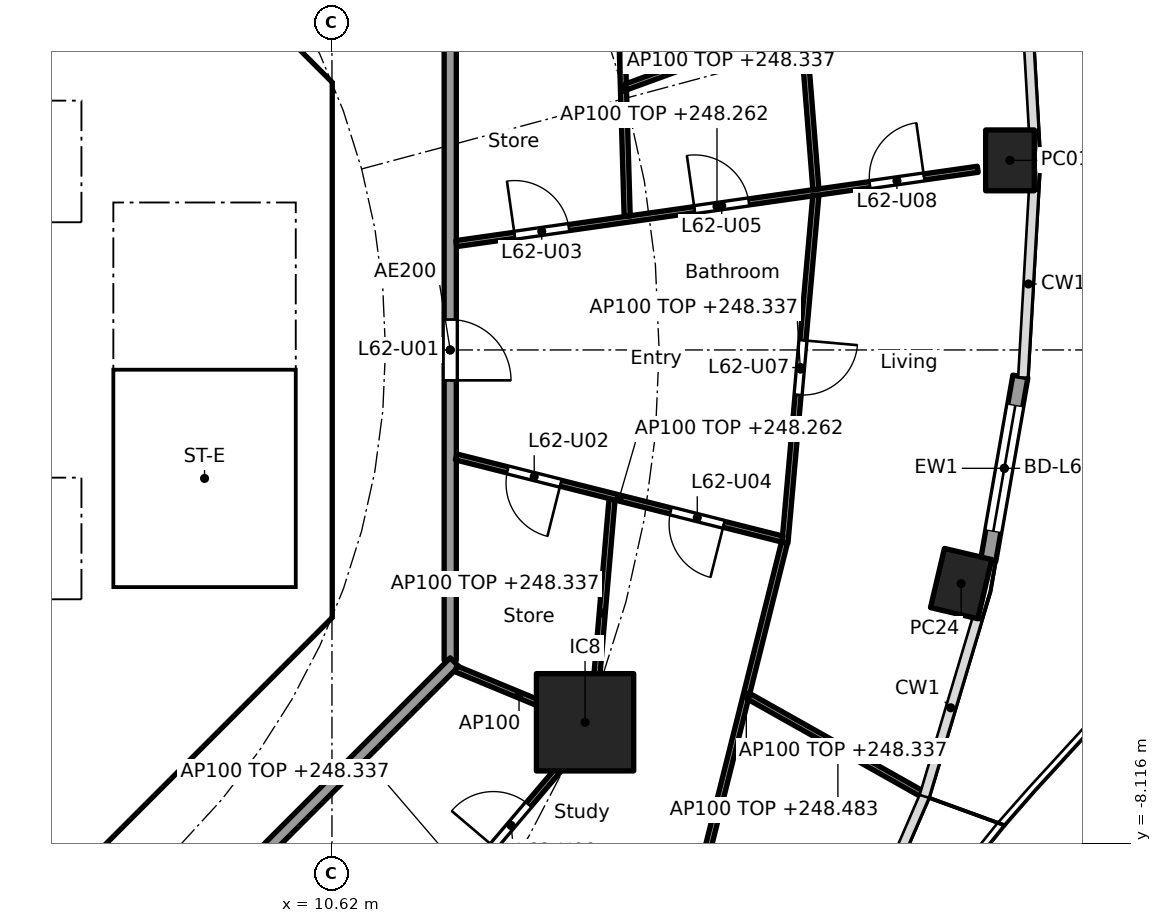
"""IFC4 building model, lengths in metres.
Left out: names, types, materials, properties, quantities, classifications, styles, units other than length and angle.
Written with IfcOpenShell. Run it as: python <this file> out.ifc"""

import sys

from ifc_helpers import new_model, si_unit, direction, frame, frame_2d, origin, origin_2d, place, context, subcontext, project, spatial, polyline, rectangle, hollow_rectangle, outline, extrude, element, fill, save


model = new_model("IFC4")
c1 = context("Model", 3, precision=1e-05, world=origin(), true_north=direction((0.0, 1.0)))
c2 = subcontext(c1, "Body", "Model", "MODEL_VIEW")
j1 = project(units=[si_unit("LENGTHUNIT", "METRE"), si_unit("PLANEANGLEUNIT", "RADIAN")], contexts=[c1])
p1 = place(None, origin())
s1 = spatial("IfcSite", under=j1, at=p1, CompositionType="ELEMENT")
p2 = place(p1, origin())
s2 = spatial("IfcBuilding", under=s1, at=p2, CompositionType="ELEMENT")
p3 = place(p2, frame((0.0, 0.0, 245.5)))
s3 = spatial("IfcBuildingStorey", under=s2, at=p3, CompositionType="ELEMENT", Elevation=245.5)
for number, where, z_axis, x_axis in (
    (1, (21.77, 3.118, 0.0), (0.0, 0.0, 1.0), (0.0, 1.0, 0.0)),
    (2, (20.967, -3.842, 0.0), (0.0, 0.0, 1.0), (0.229, 0.973, 0.0)),
):
    element("IfcColumn", number, at=place(p3, frame(where, z_axis=z_axis, x_axis=x_axis)), inside=s3, PredefinedType="COLUMN", context=c2, shape_type="SweptSolid", body=[
        extrude(hollow_rectangle(XDim=1.0, YDim=0.8, WallThickness=0.032, at=origin_2d()), origin(), (0.0, 0.0, 1.0), 3.7),
    ])
p4 = place(p3, frame((14.782, -6.123, 0.0), z_axis=(0.0, 0.0, 1.0), x_axis=(1.0, 0.0, 0.0)))
e3 = element("IfcColumn", 3, at=p4, inside=s3, PredefinedType="COLUMN", context=c2, shape_type="SweptSolid", body=[
    extrude(rectangle(XDim=1.6, YDim=1.6, at=origin_2d()), origin(), (0.0, 0.0, 1.0), 3.7),
])
p5 = place(p3, frame((21.941, -0.436, 0.0), z_axis=(0.0, 0.0, 1.0), x_axis=(-0.172164083933, -0.985068286061, 0.0)))
e4 = element("IfcWall", 4, at=p5, inside=s3, PredefinedType="SOLIDWALL", context=c2, shape_type="SweptSolid", body=[
    extrude(rectangle(XDim=3.067, YDim=0.25, at=frame_2d((1.534, 0.0))), origin(), (0.0, 0.0, 1.0), 3.44),
])
p6 = place(p5, frame((0.484, 0.0, 0.0)))
e5 = element("IfcOpeningElement", 5, at=p6, cuts=e4, PredefinedType="OPENING", context=c2, shape_type="SweptSolid", body=[
    extrude(rectangle(XDim=2.1, YDim=2.4, at=frame_2d((1.05, 1.2))), frame((0.0, 0.135, 0.0), z_axis=(0.0, -1.0, 0.0), x_axis=(1.0, 0.0, 0.0)), (0.0, 0.0, 1.0), 0.27),
])
p7 = place(p3, frame((9.988, 4.613, 0.0), z_axis=(0.0, 0.0, 1.0), x_axis=(-0.707106781187, 0.707106781187, 0.0)))
e6 = element("IfcWall", 6, at=p7, inside=s3, PredefinedType="SHEAR", context=c2, shape_type="SweptSolid", body=[
    extrude(rectangle(XDim=7.602, YDim=0.6, at=frame_2d((3.801, 0.0))), origin(), (0.0, 0.0, 1.0), 3.44),
])
p8 = place(p7, frame((3.201, 0.0, 0.0)))
e7 = element("IfcOpeningElement", 7, at=p8, cuts=e6, PredefinedType="OPENING", context=c2, shape_type="SweptSolid", body=[
    extrude(rectangle(XDim=1.2, YDim=2.1, at=frame_2d((0.6, 1.05))), frame((0.0, 0.31, 0.0), z_axis=(0.0, -1.0, 0.0), x_axis=(1.0, 0.0, 0.0)), (0.0, 0.0, 1.0), 0.62),
])
p9 = place(p3, frame((4.613, -9.988, 0.0), z_axis=(0.0, 0.0, 1.0), x_axis=(0.707106781187, 0.707106781187, 0.0)))
e8 = element("IfcWall", 8, at=p9, inside=s3, PredefinedType="SHEAR", context=c2, shape_type="SweptSolid", body=[
    extrude(rectangle(XDim=7.602, YDim=0.6, at=frame_2d((3.801, 0.0))), origin(), (0.0, 0.0, 1.0), 3.44),
])
p10 = place(p9, frame((3.201, 0.0, 0.0)))
e9 = element("IfcOpeningElement", 9, at=p10, cuts=e8, PredefinedType="OPENING", context=c2, shape_type="SweptSolid", body=[
    extrude(rectangle(XDim=1.2, YDim=2.1, at=frame_2d((0.6, 1.05))), frame((0.0, 0.31, 0.0), z_axis=(0.0, -1.0, 0.0), x_axis=(1.0, 0.0, 0.0)), (0.0, 0.0, 1.0), 0.62),
])
p11 = place(p3, frame((-6.7, 2.0, 0.0), z_axis=(0.0, 0.0, 1.0), x_axis=(1.0, 0.0, 0.0)))
e10 = element("IfcWall", 10, at=p11, inside=s3, PredefinedType="SOLIDWALL", context=c2, shape_type="SweptSolid", body=[
    extrude(rectangle(XDim=13.4, YDim=0.2, at=frame_2d((6.7, 0.0))), origin(), (0.0, 0.0, 1.0), 3.44),
])
p12 = place(p11, frame((7.25, 0.0, 0.0)))
e11 = element("IfcOpeningElement", 11, at=p12, cuts=e10, PredefinedType="OPENING", context=c2, shape_type="SweptSolid", body=[
    extrude(rectangle(XDim=1.1, YDim=2.1, at=frame_2d((0.55, 1.05))), frame((0.0, 0.11, 0.0), z_axis=(0.0, -1.0, 0.0), x_axis=(1.0, 0.0, 0.0)), (0.0, 0.0, 1.0), 0.22),
])
p13 = place(p11, frame((9.45, 0.0, 0.0)))
e12 = element("IfcOpeningElement", 12, at=p13, cuts=e10, PredefinedType="OPENING", context=c2, shape_type="SweptSolid", body=[
    extrude(rectangle(XDim=1.1, YDim=2.1, at=frame_2d((0.55, 1.05))), frame((0.0, 0.11, 0.0), z_axis=(0.0, -1.0, 0.0), x_axis=(1.0, 0.0, 0.0)), (0.0, 0.0, 1.0), 0.22),
])
p14 = place(p11, frame((0.75, 0.0, 0.0)))
e13 = element("IfcOpeningElement", 13, at=p14, cuts=e10, PredefinedType="OPENING", context=c2, shape_type="SweptSolid", body=[
    extrude(rectangle(XDim=0.9, YDim=2.1, at=frame_2d((0.45, 1.05))), frame((0.0, 0.11, 0.0), z_axis=(0.0, -1.0, 0.0), x_axis=(1.0, 0.0, 0.0)), (0.0, 0.0, 1.0), 0.22),
])
p15 = place(p11, frame((4.05, 0.0, 0.0)))
e14 = element("IfcOpeningElement", 14, at=p15, cuts=e10, PredefinedType="OPENING", context=c2, shape_type="SweptSolid", body=[
    extrude(rectangle(XDim=0.9, YDim=2.1, at=frame_2d((0.45, 1.05))), frame((0.0, 0.11, 0.0), z_axis=(0.0, -1.0, 0.0), x_axis=(1.0, 0.0, 0.0)), (0.0, 0.0, 1.0), 0.22),
])
p16 = place(p3, frame((6.7, 4.0, 0.0), z_axis=(0.0, 0.0, 1.0), x_axis=(1.0, 0.0, 0.0)))
e15 = element("IfcWall", 15, at=p16, inside=s3, PredefinedType="SOLIDWALL", context=c2, shape_type="SweptSolid", body=[
    extrude(rectangle(XDim=3.325, YDim=0.2, at=frame_2d((1.662, 0.0))), origin(), (0.0, 0.0, 1.0), 3.44),
])
p17 = place(p16, frame((1.25, 0.0, 0.0)))
e16 = element("IfcOpeningElement", 16, at=p17, cuts=e15, PredefinedType="OPENING", context=c2, shape_type="SweptSolid", body=[
    extrude(rectangle(XDim=1.1, YDim=2.1, at=frame_2d((0.55, 1.05))), frame((0.0, 0.11, 0.0), z_axis=(0.0, -1.0, 0.0), x_axis=(1.0, 0.0, 0.0)), (0.0, 0.0, 1.0), 0.22),
])
p18 = place(p3, frame((-6.7, -2.0, 0.0), z_axis=(0.0, 0.0, 1.0), x_axis=(1.0, 0.0, 0.0)))
e17 = element("IfcWall", 17, at=p18, inside=s3, PredefinedType="SOLIDWALL", context=c2, shape_type="SweptSolid", body=[
    extrude(rectangle(XDim=13.4, YDim=0.2, at=frame_2d((6.7, 0.0))), origin(), (0.0, 0.0, 1.0), 3.44),
])
p19 = place(p18, frame((5.05, 0.0, 0.0)))
e18 = element("IfcOpeningElement", 18, at=p19, cuts=e17, PredefinedType="OPENING", context=c2, shape_type="SweptSolid", body=[
    extrude(rectangle(XDim=1.1, YDim=2.1, at=frame_2d((0.55, 1.05))), frame((0.0, 0.11, 0.0), z_axis=(0.0, -1.0, 0.0), x_axis=(1.0, 0.0, 0.0)), (0.0, 0.0, 1.0), 0.22),
])
p20 = place(p18, frame((7.25, 0.0, 0.0)))
e19 = element("IfcOpeningElement", 19, at=p20, cuts=e17, PredefinedType="OPENING", context=c2, shape_type="SweptSolid", body=[
    extrude(rectangle(XDim=1.1, YDim=2.1, at=frame_2d((0.55, 1.05))), frame((0.0, 0.11, 0.0), z_axis=(0.0, -1.0, 0.0), x_axis=(1.0, 0.0, 0.0)), (0.0, 0.0, 1.0), 0.22),
])
p21 = place(p18, frame((1.85, 0.0, 0.0)))
e20 = element("IfcOpeningElement", 20, at=p21, cuts=e17, PredefinedType="OPENING", context=c2, shape_type="SweptSolid", body=[
    extrude(rectangle(XDim=0.9, YDim=2.1, at=frame_2d((0.45, 1.05))), frame((0.0, 0.11, 0.0), z_axis=(0.0, -1.0, 0.0), x_axis=(1.0, 0.0, 0.0)), (0.0, 0.0, 1.0), 0.22),
])
p22 = place(p3, origin())
e21 = element("IfcWall", 21, at=p22, inside=s3, PredefinedType="SHEAR", context=c2, shape_type="SweptSolid", body=[
    extrude(outline(polyline([(9.776, -4.401), (10.025, -4.152), (10.025, -3.801), (10.025, 4.152), (9.776, 4.401), (10.2, 4.825), (10.625, 4.401), (10.625, -4.401), (10.2, -4.825), (9.776, -4.401)])), origin(), (0.0, 0.0, 1.0), 3.44),
])
p23 = place(p3, origin())
e22 = element("IfcWall", 22, at=p23, inside=s3, PredefinedType="SOLIDWALL", context=c2, shape_type="SweptSolid", body=[
    extrude(outline(polyline([(-6.7, 4.3), (6.7, 4.3), (6.7, 2.1), (6.5, 2.1), (6.5, 4.1), (4.5, 4.1), (4.5, 2.1), (4.3, 2.1), (4.3, 4.1), (2.3, 4.1), (2.3, 2.1), (2.1, 2.1), (2.1, 4.1), (0.1, 4.1), (0.1, 2.1), (-0.1, 2.1), (-0.1, 4.1), (-4.3, 4.1), (-4.3, 2.1), (-4.5, 2.1), (-4.5, 4.1), (-6.5, 4.1), (-6.5, 2.1), (-6.7, 2.1), (-6.7, 4.3)])), origin(), (0.0, 0.0, 1.0), 3.44),
])
p24 = place(p3, origin())
e23 = element("IfcWall", 23, at=p24, inside=s3, PredefinedType="SOLIDWALL", context=c2, shape_type="SweptSolid", body=[
    extrude(outline(polyline([(-6.7, -2.1), (-6.5, -2.1), (-6.5, -4.1), (-2.3, -4.1), (-2.3, -2.1), (-2.1, -2.1), (-2.1, -4.1), (-0.1, -4.1), (-0.1, -2.1), (0.1, -2.1), (0.1, -4.1), (2.1, -4.1), (2.1, -2.1), (2.3, -2.1), (2.3, -4.1), (4.3, -4.1), (4.3, -2.1), (4.5, -2.1), (4.5, -4.1), (6.5, -4.1), (6.5, -2.1), (6.7, -2.1), (6.7, -4.3), (-6.7, -4.3), (-6.7, -2.1)])), origin(), (0.0, 0.0, 1.0), 3.44),
])
p25 = place(p3, origin())
e24 = element("IfcWall", 24, at=p25, inside=s3, PredefinedType="SOLIDWALL", context=c2, shape_type="SweptSolid", body=[
    extrude(outline(polyline([(7.025, -3.9), (6.7, -3.9), (6.7, 3.9), (7.025, 3.9), (7.025, -3.9)])), origin(), (0.0, 0.0, 1.0), 3.44),
])
p26 = place(p3, origin())
e25 = element("IfcWall", 25, at=p26, inside=s3, PredefinedType="SOLIDWALL", context=c2, shape_type="SweptSolid", body=[
    extrude(outline(polyline([(10.025, -4.1), (6.7, -4.1), (6.7, -3.9), (10.025, -3.9), (10.025, -4.1)])), origin(), (0.0, 0.0, 1.0), 3.44),
])
p27 = place(p3, frame((12.565, -5.104, 0.0), z_axis=(0.0, 0.0, 1.0), x_axis=(0.0, 1.0, 0.0)))
e26 = element("IfcWall", 26, at=p27, inside=s3, PredefinedType="PARTITIONING", context=c2, shape_type="SweptSolid", body=[
    extrude(rectangle(XDim=10.209, YDim=0.2, at=frame_2d((5.104, 0.0))), origin(), (0.0, 0.0, 1.0), 3.44),
])
p28 = place(p27, frame((4.604, 0.0, 0.0)))
e27 = element("IfcOpeningElement", 27, at=p28, cuts=e26, PredefinedType="OPENING", context=c2, shape_type="SweptSolid", body=[
    extrude(rectangle(XDim=1.0, YDim=2.1, at=frame_2d((0.5, 1.05))), frame((0.0, 0.11, 0.0), z_axis=(0.0, -1.0, 0.0), x_axis=(1.0, 0.0, 0.0)), (0.0, 0.0, 1.0), 0.22),
])
p29 = place(p3, frame((5.275, -12.494, 0.0), z_axis=(0.0, 0.0, 1.0), x_axis=(0.707106781187, 0.707106781187, 0.0)))
e28 = element("IfcWall", 28, at=p29, inside=s3, PredefinedType="PARTITIONING", context=c2, shape_type="SweptSolid", body=[
    extrude(rectangle(XDim=10.409, YDim=0.2, at=frame_2d((5.205, 0.0))), origin(), (0.0, 0.0, 1.0), 3.44),
])
p30 = place(p3, frame((12.664, 1.749, 0.0), z_axis=(0.0, 0.0, 1.0), x_axis=(0.990001845476, 0.141054407783, 0.0)))
e29 = element("IfcWall", 29, at=p30, inside=s3, PredefinedType="PARTITIONING", context=c2, shape_type="SweptSolid", body=[
    extrude(rectangle(XDim=8.663, YDim=0.1, at=frame_2d((4.332, 0.0))), origin(), (0.0, 0.0, 1.0), 2.762),
])
p31 = place(p30, frame((0.97, 0.0, 0.0)))
e30 = element("IfcOpeningElement", 30, at=p31, cuts=e29, PredefinedType="OPENING", context=c2, shape_type="SweptSolid", body=[
    extrude(rectangle(XDim=0.9, YDim=2.1, at=frame_2d((0.45, 1.05))), frame((0.0, 0.06, 0.0), z_axis=(0.0, -1.0, 0.0), x_axis=(1.0, 0.0, 0.0)), (0.0, 0.0, 1.0), 0.12),
])
p32 = place(p30, frame((3.959, 0.0, 0.0)))
e31 = element("IfcOpeningElement", 31, at=p32, cuts=e29, PredefinedType="OPENING", context=c2, shape_type="SweptSolid", body=[
    extrude(rectangle(XDim=0.9, YDim=2.1, at=frame_2d((0.45, 1.05))), frame((0.0, 0.06, 0.0), z_axis=(0.0, -1.0, 0.0), x_axis=(1.0, 0.0, 0.0)), (0.0, 0.0, 1.0), 0.12),
])
p33 = place(p30, frame((6.87, 0.0, 0.0)))
e32 = element("IfcOpeningElement", 32, at=p33, cuts=e29, PredefinedType="OPENING", context=c2, shape_type="SweptSolid", body=[
    extrude(rectangle(XDim=0.9, YDim=2.1, at=frame_2d((0.45, 1.05))), frame((0.0, 0.06, 0.0), z_axis=(0.0, -1.0, 0.0), x_axis=(1.0, 0.0, 0.0)), (0.0, 0.0, 1.0), 0.12),
])
p34 = place(p3, frame((15.475, 2.2, 0.0), z_axis=(0.0, 0.0, 1.0), x_axis=(-0.029254623973, 0.999571991893, 0.0)))
e33 = element("IfcWall", 33, at=p34, inside=s3, PredefinedType="PARTITIONING", context=c2, shape_type="SweptSolid", body=[
    extrude(rectangle(XDim=4.173, YDim=0.1, at=frame_2d((2.086, 0.0))), origin(), (0.0, 0.0, 1.0), 2.837),
])
p35 = place(p3, frame((18.578, 2.642, 0.0), z_axis=(0.0, 0.0, 1.0), x_axis=(-0.079188322924, 0.996859673932, 0.0)))
e34 = element("IfcWall", 34, at=p35, inside=s3, PredefinedType="PARTITIONING", context=c2, shape_type="SweptSolid", body=[
    extrude(rectangle(XDim=5.454, YDim=0.1, at=frame_2d((2.727, 0.0))), origin(), (0.0, 0.0, 1.0), 2.837),
])
p36 = place(p35, frame((3.653, 0.0, 0.0)))
e35 = element("IfcOpeningElement", 35, at=p36, cuts=e34, PredefinedType="OPENING", context=c2, shape_type="SweptSolid", body=[
    extrude(rectangle(XDim=0.9, YDim=2.1, at=frame_2d((0.45, 1.05))), frame((0.0, 0.06, 0.0), z_axis=(0.0, -1.0, 0.0), x_axis=(1.0, 0.0, 0.0)), (0.0, 0.0, 1.0), 0.12),
])
p37 = place(p3, frame((18.578, 2.542, 0.0), z_axis=(0.0, 0.0, 1.0), x_axis=(-0.088651453697, -0.996062708748, 0.0)))
e36 = element("IfcWall", 36, at=p37, inside=s3, PredefinedType="PARTITIONING", context=c2, shape_type="SweptSolid", body=[
    extrude(rectangle(XDim=5.737, YDim=0.1, at=frame_2d((2.868, 0.0))), origin(), (0.0, 0.0, 1.0), 2.837),
])
p38 = place(p37, frame((2.393, 0.0, 0.0)))
e37 = element("IfcOpeningElement", 37, at=p38, cuts=e36, PredefinedType="OPENING", context=c2, shape_type="SweptSolid", body=[
    extrude(rectangle(XDim=0.9, YDim=2.1, at=frame_2d((0.45, 1.05))), frame((0.0, 0.06, 0.0), z_axis=(0.0, -1.0, 0.0), x_axis=(1.0, 0.0, 0.0)), (0.0, 0.0, 1.0), 0.12),
])
p39 = place(p3, frame((15.46, 4.327, 0.0), z_axis=(0.0, 0.0, 1.0), x_axis=(0.939452643938, 0.342678755977, 0.0)))
e38 = element("IfcWall", 38, at=p39, inside=s3, PredefinedType="PARTITIONING", context=c2, shape_type="SweptSolid", body=[
    extrude(rectangle(XDim=3.037, YDim=0.1, at=frame_2d((1.519, 0.0))), origin(), (0.0, 0.0, 1.0), 3.44),
])
p40 = place(p3, frame((10.753, -11.132, 0.0), z_axis=(0.0, 0.0, 1.0), x_axis=(0.64700741656, 0.762483706657, 0.0)))
e39 = element("IfcWall", 39, at=p40, inside=s3, PredefinedType="PARTITIONING", context=c2, shape_type="SweptSolid", body=[
    extrude(rectangle(XDim=6.459, YDim=0.1, at=frame_2d((3.229, 0.0))), origin(), (0.0, 0.0, 1.0), 2.837),
])
p41 = place(p40, frame((3.896, 0.0, 0.0)))
e40 = element("IfcOpeningElement", 40, at=p41, cuts=e39, PredefinedType="OPENING", context=c2, shape_type="SweptSolid", body=[
    extrude(rectangle(XDim=0.9, YDim=2.1, at=frame_2d((0.45, 1.05))), frame((0.0, 0.06, 0.0), z_axis=(0.0, -1.0, 0.0), x_axis=(1.0, 0.0, 0.0)), (0.0, 0.0, 1.0), 0.12),
])
p42 = place(p3, frame((12.657, -5.243, 0.0), z_axis=(0.0, 0.0, 1.0), x_axis=(0.923864733477, -0.382719158442, 0.0)))
e41 = element("IfcWall", 41, at=p42, inside=s3, PredefinedType="PARTITIONING", context=c2, shape_type="SweptSolid", body=[
    extrude(rectangle(XDim=2.25, YDim=0.1, at=frame_2d((1.125, 0.0))), origin(), (0.0, 0.0, 1.0), 3.44),
])
p43 = place(p3, frame((14.904, -6.196, 0.0), z_axis=(0.0, 0.0, 1.0), x_axis=(0.085843822439, 0.996308605879, 0.0)))
e42 = element("IfcWall", 42, at=p43, inside=s3, PredefinedType="PARTITIONING", context=c2, shape_type="SweptSolid", body=[
    extrude(rectangle(XDim=3.754, YDim=0.1, at=frame_2d((1.877, 0.0))), origin(), (0.0, 0.0, 1.0), 2.837),
])
p44 = place(p3, frame((16.807, -8.177, 0.0), z_axis=(0.0, 0.0, 1.0), x_axis=(0.243002985225, 0.970025540474, 0.0)))
e43 = element("IfcWall", 43, at=p44, inside=s3, PredefinedType="PARTITIONING", context=c2, shape_type="SweptSolid", body=[
    extrude(rectangle(XDim=5.162, YDim=0.1, at=frame_2d((2.581, 0.0))), origin(), (0.0, 0.0, 1.0), 2.837),
])
p45 = place(p3, frame((17.478, -5.698, 0.0), z_axis=(0.0, 0.0, 1.0), x_axis=(0.871478399743, -0.490433888288, 0.0)))
e44 = element("IfcWall", 44, at=p45, inside=s3, PredefinedType="PARTITIONING", context=c2, shape_type="SweptSolid", body=[
    extrude(rectangle(XDim=3.357, YDim=0.1, at=frame_2d((1.678, 0.0))), origin(), (0.0, 0.0, 1.0), 2.983),
])
p46 = place(p3, frame((12.662, -1.759, 0.0), z_axis=(0.0, 0.0, 1.0), x_axis=(0.969746519828, -0.24411408661, 0.0)))
e45 = element("IfcWall", 45, at=p46, inside=s3, PredefinedType="PARTITIONING", context=c2, shape_type="SweptSolid", body=[
    extrude(rectangle(XDim=5.531, YDim=0.1, at=frame_2d((2.765, 0.0))), origin(), (0.0, 0.0, 1.0), 2.762),
])
p47 = place(p46, frame((0.874, 0.0, 0.0)))
e46 = element("IfcOpeningElement", 46, at=p47, cuts=e45, PredefinedType="OPENING", context=c2, shape_type="SweptSolid", body=[
    extrude(rectangle(XDim=0.9, YDim=2.1, at=frame_2d((0.45, 1.05))), frame((0.0, 0.06, 0.0), z_axis=(0.0, -1.0, 0.0), x_axis=(1.0, 0.0, 0.0)), (0.0, 0.0, 1.0), 0.12),
])
p48 = place(p46, frame((3.64, 0.0, 0.0)))
e47 = element("IfcOpeningElement", 47, at=p48, cuts=e45, PredefinedType="OPENING", context=c2, shape_type="SweptSolid", body=[
    extrude(rectangle(XDim=0.9, YDim=2.1, at=frame_2d((0.45, 1.05))), frame((0.0, 0.06, 0.0), z_axis=(0.0, -1.0, 0.0), x_axis=(1.0, 0.0, 0.0)), (0.0, 0.0, 1.0), 0.12),
])
p49 = place(p6, origin())
e48 = element("IfcDoor", 48, at=p49, inside=s3, OperationType="SLIDING_TO_LEFT", PredefinedType="DOOR", context=c2, shape_type="SweptSolid", body=[
    extrude(rectangle(XDim=2.1, YDim=2.4, at=frame_2d((1.05, 1.2))), frame((0.0, 0.025, 0.0), z_axis=(0.0, -1.0, 0.0), x_axis=(1.0, 0.0, 0.0)), (0.0, 0.0, 1.0), 0.05),
])
fill(e5, e48)
p50 = place(p17, frame((1.1, 0.0, 0.0), x_axis=(-1.0, 0.0, 0.0)))
e49 = element("IfcDoor", 49, at=p50, inside=s3, OperationType="SINGLE_SWING_LEFT", PredefinedType="DOOR", context=c2, shape_type="SweptSolid", body=[
    extrude(rectangle(XDim=1.1, YDim=2.1, at=frame_2d((0.55, 1.05))), frame((0.0, 0.025, 0.0), z_axis=(0.0, -1.0, 0.0), x_axis=(1.0, 0.0, 0.0)), (0.0, 0.0, 1.0), 0.05),
])
fill(e16, e49)
p51 = place(p10, origin())
e50 = element("IfcDoor", 50, at=p51, inside=s3, OperationType="SINGLE_SWING_RIGHT", PredefinedType="DOOR", context=c2, shape_type="SweptSolid", body=[
    extrude(rectangle(XDim=1.2, YDim=2.1, at=frame_2d((0.6, 1.05))), frame((0.0, 0.025, 0.0), z_axis=(0.0, -1.0, 0.0), x_axis=(1.0, 0.0, 0.0)), (0.0, 0.0, 1.0), 0.05),
])
fill(e9, e50)
p52 = place(p28, frame((1.0, 0.0, 0.0), x_axis=(-1.0, 0.0, 0.0)))
e51 = element("IfcDoor", 51, at=p52, inside=s3, OperationType="SINGLE_SWING_RIGHT", PredefinedType="DOOR", context=c2, shape_type="SweptSolid", body=[
    extrude(rectangle(XDim=1.0, YDim=2.1, at=frame_2d((0.5, 1.05))), frame((0.0, 0.025, 0.0), z_axis=(0.0, -1.0, 0.0), x_axis=(1.0, 0.0, 0.0)), (0.0, 0.0, 1.0), 0.05),
])
fill(e27, e51)
p53 = place(p47, frame((0.9, 0.0, 0.0), x_axis=(-1.0, 0.0, 0.0)))
e52 = element("IfcDoor", 52, at=p53, inside=s3, OperationType="SINGLE_SWING_LEFT", PredefinedType="DOOR", context=c2, shape_type="SweptSolid", body=[
    extrude(rectangle(XDim=0.9, YDim=2.1, at=frame_2d((0.45, 1.05))), frame((0.0, 0.025, 0.0), z_axis=(0.0, -1.0, 0.0), x_axis=(1.0, 0.0, 0.0)), (0.0, 0.0, 1.0), 0.05),
])
fill(e46, e52)
p54 = place(p31, origin())
e53 = element("IfcDoor", 53, at=p54, inside=s3, OperationType="SINGLE_SWING_LEFT", PredefinedType="DOOR", context=c2, shape_type="SweptSolid", body=[
    extrude(rectangle(XDim=0.9, YDim=2.1, at=frame_2d((0.45, 1.05))), frame((0.0, 0.025, 0.0), z_axis=(0.0, -1.0, 0.0), x_axis=(1.0, 0.0, 0.0)), (0.0, 0.0, 1.0), 0.05),
])
fill(e30, e53)
p55 = place(p48, frame((0.9, 0.0, 0.0), x_axis=(-1.0, 0.0, 0.0)))
e54 = element("IfcDoor", 54, at=p55, inside=s3, OperationType="SINGLE_SWING_LEFT", PredefinedType="DOOR", context=c2, shape_type="SweptSolid", body=[
    extrude(rectangle(XDim=0.9, YDim=2.1, at=frame_2d((0.45, 1.05))), frame((0.0, 0.025, 0.0), z_axis=(0.0, -1.0, 0.0), x_axis=(1.0, 0.0, 0.0)), (0.0, 0.0, 1.0), 0.05),
])
fill(e47, e54)
p56 = place(p32, origin())
e55 = element("IfcDoor", 55, at=p56, inside=s3, OperationType="SINGLE_SWING_LEFT", PredefinedType="DOOR", context=c2, shape_type="SweptSolid", body=[
    extrude(rectangle(XDim=0.9, YDim=2.1, at=frame_2d((0.45, 1.05))), frame((0.0, 0.025, 0.0), z_axis=(0.0, -1.0, 0.0), x_axis=(1.0, 0.0, 0.0)), (0.0, 0.0, 1.0), 0.05),
])
fill(e31, e55)
p57 = place(p38, origin())
e56 = element("IfcDoor", 56, at=p57, inside=s3, OperationType="SINGLE_SWING_LEFT", PredefinedType="DOOR", context=c2, shape_type="SweptSolid", body=[
    extrude(rectangle(XDim=0.9, YDim=2.1, at=frame_2d((0.45, 1.05))), frame((0.0, 0.025, 0.0), z_axis=(0.0, -1.0, 0.0), x_axis=(1.0, 0.0, 0.0)), (0.0, 0.0, 1.0), 0.05),
])
fill(e37, e56)
p58 = place(p33, origin())
e57 = element("IfcDoor", 57, at=p58, inside=s3, OperationType="SINGLE_SWING_RIGHT", PredefinedType="DOOR", context=c2, shape_type="SweptSolid", body=[
    extrude(rectangle(XDim=0.9, YDim=2.1, at=frame_2d((0.45, 1.05))), frame((0.0, 0.025, 0.0), z_axis=(0.0, -1.0, 0.0), x_axis=(1.0, 0.0, 0.0)), (0.0, 0.0, 1.0), 0.05),
])
fill(e32, e57)
p59 = place(p41, origin())
e58 = element("IfcDoor", 58, at=p59, inside=s3, OperationType="SINGLE_SWING_LEFT", PredefinedType="DOOR", context=c2, shape_type="SweptSolid", body=[
    extrude(rectangle(XDim=0.9, YDim=2.1, at=frame_2d((0.45, 1.05))), frame((0.0, 0.025, 0.0), z_axis=(0.0, -1.0, 0.0), x_axis=(1.0, 0.0, 0.0)), (0.0, 0.0, 1.0), 0.05),
])
fill(e40, e58)
save(model, sys.argv[1])
